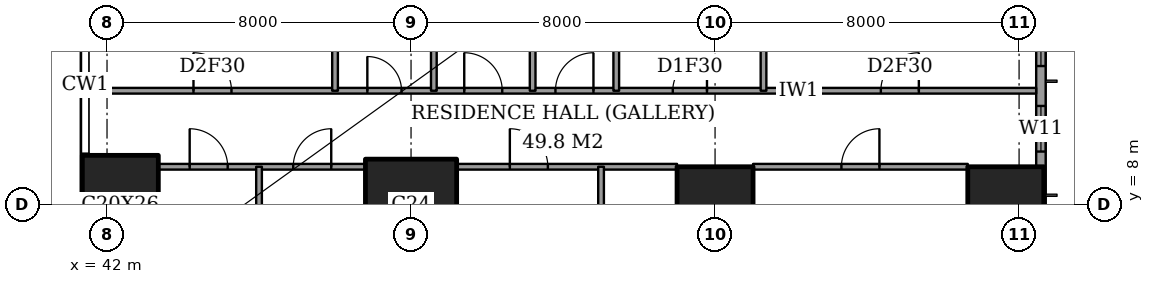
"""IFC4 building model, lengths in metres.
Left out: names, types, materials, properties, quantities, classifications, styles, units other than length and angle.
Written with IfcOpenShell. Run it as: python <this file> out.ifc"""

import sys

from ifc_helpers import new_model, si_unit, direction, frame, frame_2d, origin, origin_2d, place, context, subcontext, project, spatial, rectangle, extrude, element, fill, save


model = new_model("IFC4")
c1 = context("Model", 3, precision=1e-05, world=origin(), true_north=direction((0.0, 1.0)))
c2 = subcontext(c1, "Body", "Model", "MODEL_VIEW")
j1 = project(units=[si_unit("LENGTHUNIT", "METRE"), si_unit("PLANEANGLEUNIT", "RADIAN")], contexts=[c1])
p1 = place(None, origin())
s1 = spatial("IfcSite", under=j1, at=p1, CompositionType="ELEMENT")
p2 = place(p1, origin())
s2 = spatial("IfcBuilding", under=s1, at=p2, CompositionType="ELEMENT")
p3 = place(p2, frame((0.0, 0.0, 153.8)))
s3 = spatial("IfcBuildingStorey", under=s2, at=p3, CompositionType="ELEMENT", Elevation=153.8)
p4 = place(p3, frame((42.35, 8.0, 0.0), z_axis=(0.0, 0.0, 1.0), x_axis=(1.0, 0.0, 0.0)))
e1 = element("IfcColumn", 1, at=p4, inside=s3, PredefinedType="COLUMN", context=c2, shape_type="SweptSolid", body=[
    extrude(rectangle(XDim=2.0, YDim=2.6, at=origin_2d()), origin(), (0.0, 0.0, 1.0), 3.6),
])
p5 = place(p3, frame((50.0, 8.0, 0.0), z_axis=(0.0, 0.0, 1.0), x_axis=(1.0, 0.0, 0.0)))
e2 = element("IfcColumn", 2, at=p5, inside=s3, PredefinedType="COLUMN", context=c2, shape_type="SweptSolid", body=[
    extrude(rectangle(XDim=2.4, YDim=2.4, at=origin_2d()), origin(), (0.0, 0.0, 1.0), 3.6),
])
for number, where, z_axis, x_axis in (
    (3, (58.0, 8.0, 0.0), (0.0, 0.0, 1.0), (1.0, 0.0, 0.0)),
    (4, (65.65, 8.0, 0.0), (0.0, 0.0, 1.0), (1.0, 0.0, 0.0)),
):
    element("IfcColumn", number, at=place(p3, frame(where, z_axis=z_axis, x_axis=x_axis)), inside=s3, PredefinedType="COLUMN", context=c2, shape_type="SweptSolid", body=[
        extrude(rectangle(XDim=2.0, YDim=2.0, at=origin_2d()), origin(), (0.0, 0.0, 1.0), 3.6),
    ])
p6 = place(p3, frame((66.575, 3.175, 0.0), z_axis=(0.0, 0.0, 1.0), x_axis=(0.0, 1.0, 0.0)))
e5 = element("IfcWall", 5, at=p6, inside=s3, PredefinedType="SOLIDWALL", context=c2, shape_type="SweptSolid", body=[
    extrude(rectangle(XDim=41.65, YDim=0.25, at=frame_2d((20.825, 0.0))), origin(), (0.0, 0.0, 1.0), 3.6),
])
p7 = place(p6, frame((0.775, 0.0, 0.4)))
e6 = element("IfcOpeningElement", 6, at=p7, cuts=e5, PredefinedType="OPENING", context=c2, shape_type="SweptSolid", body=[
    extrude(rectangle(XDim=2.4, YDim=2.2, at=frame_2d((1.2, 1.1))), frame((0.0, 0.135, 0.0), z_axis=(0.0, -1.0, 0.0), x_axis=(1.0, 0.0, 0.0)), (0.0, 0.0, 1.0), 0.27),
])
p8 = place(p6, frame((6.225, 0.0, 0.4)))
e7 = element("IfcOpeningElement", 7, at=p8, cuts=e5, PredefinedType="OPENING", context=c2, shape_type="SweptSolid", body=[
    extrude(rectangle(XDim=1.2, YDim=2.2, at=frame_2d((0.6, 1.1))), frame((0.0, 0.135, 0.0), z_axis=(0.0, -1.0, 0.0), x_axis=(1.0, 0.0, 0.0)), (0.0, 0.0, 1.0), 0.27),
])
p9 = place(p6, frame((8.475, 0.0, 0.4)))
e8 = element("IfcOpeningElement", 8, at=p9, cuts=e5, PredefinedType="OPENING", context=c2, shape_type="SweptSolid", body=[
    extrude(rectangle(XDim=2.4, YDim=2.2, at=frame_2d((1.2, 1.1))), frame((0.0, 0.135, 0.0), z_axis=(0.0, -1.0, 0.0), x_axis=(1.0, 0.0, 0.0)), (0.0, 0.0, 1.0), 0.27),
])
p10 = place(p6, frame((15.775, 0.0, 0.4)))
e9 = element("IfcOpeningElement", 9, at=p10, cuts=e5, PredefinedType="OPENING", context=c2, shape_type="SweptSolid", body=[
    extrude(rectangle(XDim=2.4, YDim=2.2, at=frame_2d((1.2, 1.1))), frame((0.0, 0.135, 0.0), z_axis=(0.0, -1.0, 0.0), x_axis=(1.0, 0.0, 0.0)), (0.0, 0.0, 1.0), 0.27),
])
p11 = place(p6, frame((23.475, 0.0, 0.4)))
e10 = element("IfcOpeningElement", 10, at=p11, cuts=e5, PredefinedType="OPENING", context=c2, shape_type="SweptSolid", body=[
    extrude(rectangle(XDim=2.4, YDim=2.2, at=frame_2d((1.2, 1.1))), frame((0.0, 0.135, 0.0), z_axis=(0.0, -1.0, 0.0), x_axis=(1.0, 0.0, 0.0)), (0.0, 0.0, 1.0), 0.27),
])
p12 = place(p6, frame((30.975, 0.0, 0.4)))
e11 = element("IfcOpeningElement", 11, at=p12, cuts=e5, PredefinedType="OPENING", context=c2, shape_type="SweptSolid", body=[
    extrude(rectangle(XDim=2.4, YDim=2.2, at=frame_2d((1.2, 1.1))), frame((0.0, 0.135, 0.0), z_axis=(0.0, -1.0, 0.0), x_axis=(1.0, 0.0, 0.0)), (0.0, 0.0, 1.0), 0.27),
])
p13 = place(p6, frame((34.5, 0.0, 0.4)))
e12 = element("IfcOpeningElement", 12, at=p13, cuts=e5, PredefinedType="OPENING", context=c2, shape_type="SweptSolid", body=[
    extrude(rectangle(XDim=1.2, YDim=2.2, at=frame_2d((0.6, 1.1))), frame((0.0, 0.135, 0.0), z_axis=(0.0, -1.0, 0.0), x_axis=(1.0, 0.0, 0.0)), (0.0, 0.0, 1.0), 0.27),
])
p14 = place(p6, frame((38.475, 0.0, 0.4)))
e13 = element("IfcOpeningElement", 13, at=p14, cuts=e5, PredefinedType="OPENING", context=c2, shape_type="SweptSolid", body=[
    extrude(rectangle(XDim=2.4, YDim=2.2, at=frame_2d((1.2, 1.1))), frame((0.0, 0.135, 0.0), z_axis=(0.0, -1.0, 0.0), x_axis=(1.0, 0.0, 0.0)), (0.0, 0.0, 1.0), 0.27),
])
p15 = place(p3, frame((43.35, 9.0, 0.0), z_axis=(0.0, 0.0, 1.0), x_axis=(1.0, 0.0, 0.0)))
e14 = element("IfcWall", 14, at=p15, inside=s3, PredefinedType="PARTITIONING", context=c2, shape_type="SweptSolid", body=[
    extrude(rectangle(XDim=5.45, YDim=0.15, at=frame_2d((2.725, 0.0))), origin(), (0.0, 0.0, 1.0), 3.35),
])
p16 = place(p15, frame((3.55, 0.0, 0.0)))
e15 = element("IfcOpeningElement", 15, at=p16, cuts=e14, PredefinedType="OPENING", context=c2, shape_type="SweptSolid", body=[
    extrude(rectangle(XDim=1.0, YDim=2.1, at=frame_2d((0.5, 1.05))), frame((0.0, 0.085, 0.0), z_axis=(0.0, -1.0, 0.0), x_axis=(1.0, 0.0, 0.0)), (0.0, 0.0, 1.0), 0.17),
])
p17 = place(p15, frame((0.825, 0.0, 0.0)))
e16 = element("IfcOpeningElement", 16, at=p17, cuts=e14, PredefinedType="OPENING", context=c2, shape_type="SweptSolid", body=[
    extrude(rectangle(XDim=1.0, YDim=2.1, at=frame_2d((0.5, 1.05))), frame((0.0, 0.085, 0.0), z_axis=(0.0, -1.0, 0.0), x_axis=(1.0, 0.0, 0.0)), (0.0, 0.0, 1.0), 0.17),
])
p18 = place(p3, frame((51.2, 9.0, 0.0), z_axis=(0.0, 0.0, 1.0), x_axis=(1.0, 0.0, 0.0)))
e17 = element("IfcWall", 17, at=p18, inside=s3, PredefinedType="PARTITIONING", context=c2, shape_type="SweptSolid", body=[
    extrude(rectangle(XDim=5.8, YDim=0.15, at=frame_2d((2.9, 0.0))), origin(), (0.0, 0.0, 1.0), 3.35),
])
p19 = place(p18, frame((1.4, 0.0, 0.0)))
e18 = element("IfcOpeningElement", 18, at=p19, cuts=e17, PredefinedType="OPENING", context=c2, shape_type="SweptSolid", body=[
    extrude(rectangle(XDim=1.0, YDim=2.1, at=frame_2d((0.5, 1.05))), frame((0.0, 0.085, 0.0), z_axis=(0.0, -1.0, 0.0), x_axis=(1.0, 0.0, 0.0)), (0.0, 0.0, 1.0), 0.17),
])
p20 = place(p3, frame((59.0, 9.0, 0.0), z_axis=(0.0, 0.0, 1.0), x_axis=(1.0, 0.0, 0.0)))
e19 = element("IfcWall", 19, at=p20, inside=s3, PredefinedType="PARTITIONING", context=c2, shape_type="SweptSolid", body=[
    extrude(rectangle(XDim=5.65, YDim=0.15, at=frame_2d((2.825, 0.0))), origin(), (0.0, 0.0, 1.0), 3.35),
])
p21 = place(p20, frame((2.325, 0.0, 0.0)))
e20 = element("IfcOpeningElement", 20, at=p21, cuts=e19, PredefinedType="OPENING", context=c2, shape_type="SweptSolid", body=[
    extrude(rectangle(XDim=1.0, YDim=2.1, at=frame_2d((0.5, 1.05))), frame((0.0, 0.085, 0.0), z_axis=(0.0, -1.0, 0.0), x_axis=(1.0, 0.0, 0.0)), (0.0, 0.0, 1.0), 0.17),
])
p22 = place(p3, frame((41.439, 11.0, 0.0), z_axis=(0.0, 0.0, 1.0), x_axis=(1.0, 0.0, 0.0)))
e21 = element("IfcWall", 21, at=p22, inside=s3, PredefinedType="PARTITIONING", context=c2, shape_type="SweptSolid", body=[
    extrude(rectangle(XDim=25.011, YDim=0.15, at=frame_2d((12.505, 0.0))), origin(), (0.0, 0.0, 1.0), 3.35),
])
p23 = place(p22, frame((12.361, 0.0, 0.0)))
e22 = element("IfcOpeningElement", 22, at=p23, cuts=e21, PredefinedType="OPENING", context=c2, shape_type="SweptSolid", body=[
    extrude(rectangle(XDim=1.0, YDim=2.1, at=frame_2d((0.5, 1.05))), frame((0.0, 0.085, 0.0), z_axis=(0.0, -1.0, 0.0), x_axis=(1.0, 0.0, 0.0)), (0.0, 0.0, 1.0), 0.17),
])
p24 = place(p22, frame((20.924, 0.0, 0.0)))
e23 = element("IfcOpeningElement", 23, at=p24, cuts=e21, PredefinedType="OPENING", context=c2, shape_type="SweptSolid", body=[
    extrude(rectangle(XDim=1.0, YDim=2.1, at=frame_2d((0.5, 1.05))), frame((0.0, 0.085, 0.0), z_axis=(0.0, -1.0, 0.0), x_axis=(1.0, 0.0, 0.0)), (0.0, 0.0, 1.0), 0.17),
])
p25 = place(p22, frame((15.448, 0.0, 0.0)))
e24 = element("IfcOpeningElement", 24, at=p25, cuts=e21, PredefinedType="OPENING", context=c2, shape_type="SweptSolid", body=[
    extrude(rectangle(XDim=0.9, YDim=2.1, at=frame_2d((0.45, 1.05))), frame((0.0, 0.085, 0.0), z_axis=(0.0, -1.0, 0.0), x_axis=(1.0, 0.0, 0.0)), (0.0, 0.0, 1.0), 0.17),
])
p26 = place(p22, frame((9.961, 0.0, 0.0)))
e25 = element("IfcOpeningElement", 25, at=p26, cuts=e21, PredefinedType="OPENING", context=c2, shape_type="SweptSolid", body=[
    extrude(rectangle(XDim=1.0, YDim=2.1, at=frame_2d((0.5, 1.05))), frame((0.0, 0.085, 0.0), z_axis=(0.0, -1.0, 0.0), x_axis=(1.0, 0.0, 0.0)), (0.0, 0.0, 1.0), 0.17),
])
p27 = place(p22, frame((7.411, 0.0, 0.0)))
e26 = element("IfcOpeningElement", 26, at=p27, cuts=e21, PredefinedType="OPENING", context=c2, shape_type="SweptSolid", body=[
    extrude(rectangle(XDim=0.9, YDim=2.1, at=frame_2d((0.45, 1.05))), frame((0.0, 0.085, 0.0), z_axis=(0.0, -1.0, 0.0), x_axis=(1.0, 0.0, 0.0)), (0.0, 0.0, 1.0), 0.17),
])
p28 = place(p22, frame((2.836, 0.0, 0.0)))
e27 = element("IfcOpeningElement", 27, at=p28, cuts=e21, PredefinedType="OPENING", context=c2, shape_type="SweptSolid", body=[
    extrude(rectangle(XDim=1.0, YDim=2.1, at=frame_2d((0.5, 1.05))), frame((0.0, 0.085, 0.0), z_axis=(0.0, -1.0, 0.0), x_axis=(1.0, 0.0, 0.0)), (0.0, 0.0, 1.0), 0.17),
])
p29 = place(p3, frame((46.0, -0.45, 0.0), z_axis=(0.0, 0.0, 1.0), x_axis=(0.0, 1.0, 0.0)))
e28 = element("IfcWall", 28, at=p29, inside=s3, PredefinedType="PARTITIONING", context=c2, shape_type="SweptSolid", body=[
    extrude(rectangle(XDim=9.45, YDim=0.15, at=frame_2d((4.725, 0.0))), origin(), (0.0, 0.0, 1.0), 3.35),
])
p30 = place(p3, frame((48.0, 11.0, 0.0), z_axis=(0.0, 0.0, 1.0), x_axis=(0.0, 1.0, 0.0)))
e29 = element("IfcWall", 29, at=p30, inside=s3, PredefinedType="PARTITIONING", context=c2, shape_type="SweptSolid", body=[
    extrude(rectangle(XDim=6.5, YDim=0.15, at=frame_2d((3.25, 0.0))), origin(), (0.0, 0.0, 1.0), 3.35),
])
p31 = place(p3, frame((50.6, 11.0, 0.0), z_axis=(0.0, 0.0, 1.0), x_axis=(0.0, 1.0, 0.0)))
e30 = element("IfcWall", 30, at=p31, inside=s3, PredefinedType="PARTITIONING", context=c2, shape_type="SweptSolid", body=[
    extrude(rectangle(XDim=3.8, YDim=0.15, at=frame_2d((1.9, 0.0))), origin(), (0.0, 0.0, 1.0), 3.35),
])
p32 = place(p3, frame((53.2, 11.0, 0.0), z_axis=(0.0, 0.0, 1.0), x_axis=(0.0, 1.0, 0.0)))
e31 = element("IfcWall", 31, at=p32, inside=s3, PredefinedType="PARTITIONING", context=c2, shape_type="SweptSolid", body=[
    extrude(rectangle(XDim=6.5, YDim=0.15, at=frame_2d((3.25, 0.0))), origin(), (0.0, 0.0, 1.0), 3.35),
])
p33 = place(p3, frame((55.0, -0.45, 0.0), z_axis=(0.0, 0.0, 1.0), x_axis=(0.0, 1.0, 0.0)))
e32 = element("IfcWall", 32, at=p33, inside=s3, PredefinedType="PARTITIONING", context=c2, shape_type="SweptSolid", body=[
    extrude(rectangle(XDim=9.45, YDim=0.15, at=frame_2d((4.725, 0.0))), origin(), (0.0, 0.0, 1.0), 3.35),
])
p34 = place(p3, frame((55.4, 11.0, 0.0), z_axis=(0.0, 0.0, 1.0), x_axis=(0.0, 1.0, 0.0)))
e33 = element("IfcWall", 33, at=p34, inside=s3, PredefinedType="PARTITIONING", context=c2, shape_type="SweptSolid", body=[
    extrude(rectangle(XDim=10.6, YDim=0.15, at=frame_2d((5.3, 0.0))), origin(), (0.0, 0.0, 1.0), 3.35),
])
p35 = place(p34, frame((8.05, 0.0, 0.0)))
e34 = element("IfcOpeningElement", 34, at=p35, cuts=e33, PredefinedType="OPENING", context=c2, shape_type="SweptSolid", body=[
    extrude(rectangle(XDim=1.0, YDim=2.1, at=frame_2d((0.5, 1.05))), frame((0.0, 0.085, 0.0), z_axis=(0.0, -1.0, 0.0), x_axis=(1.0, 0.0, 0.0)), (0.0, 0.0, 1.0), 0.17),
])
p36 = place(p3, frame((59.275, 11.0, 0.0), z_axis=(0.0, 0.0, 1.0), x_axis=(0.0, 1.0, 0.0)))
e35 = element("IfcWall", 35, at=p36, inside=s3, PredefinedType="PARTITIONING", context=c2, shape_type="SweptSolid", body=[
    extrude(rectangle(XDim=3.8, YDim=0.15, at=frame_2d((1.9, 0.0))), origin(), (0.0, 0.0, 1.0), 3.35),
])
p37 = place(p8, origin())
e36 = element("IfcWindow", 36, at=p37, inside=s3, PartitioningType="SINGLE_PANEL", PredefinedType="WINDOW", context=c2, shape_type="SweptSolid", body=[
    extrude(rectangle(XDim=1.2, YDim=2.2, at=frame_2d((0.6, 1.1))), frame((0.0, 0.03, 0.0), z_axis=(0.0, -1.0, 0.0), x_axis=(1.0, 0.0, 0.0)), (0.0, 0.0, 1.0), 0.06),
])
fill(e7, e36)
p38 = place(p9, origin())
e37 = element("IfcWindow", 37, at=p38, inside=s3, PartitioningType="SINGLE_PANEL", PredefinedType="WINDOW", context=c2, shape_type="SweptSolid", body=[
    extrude(rectangle(XDim=2.4, YDim=2.2, at=frame_2d((1.2, 1.1))), frame((0.0, 0.03, 0.0), z_axis=(0.0, -1.0, 0.0), x_axis=(1.0, 0.0, 0.0)), (0.0, 0.0, 1.0), 0.06),
])
fill(e8, e37)
p39 = place(p21, origin())
e38 = element("IfcDoor", 38, at=p39, inside=s3, OperationType="SINGLE_SWING_LEFT", PredefinedType="DOOR", context=c2, shape_type="SweptSolid", body=[
    extrude(rectangle(XDim=1.0, YDim=2.1, at=frame_2d((0.5, 1.05))), frame((0.0, 0.025, 0.0), z_axis=(0.0, -1.0, 0.0), x_axis=(1.0, 0.0, 0.0)), (0.0, 0.0, 1.0), 0.05),
])
fill(e20, e38)
p40 = place(p19, origin())
e39 = element("IfcDoor", 39, at=p40, inside=s3, OperationType="SINGLE_SWING_RIGHT", PredefinedType="DOOR", context=c2, shape_type="SweptSolid", body=[
    extrude(rectangle(XDim=1.0, YDim=2.1, at=frame_2d((0.5, 1.05))), frame((0.0, 0.025, 0.0), z_axis=(0.0, -1.0, 0.0), x_axis=(1.0, 0.0, 0.0)), (0.0, 0.0, 1.0), 0.05),
])
fill(e18, e39)
p41 = place(p16, origin())
e40 = element("IfcDoor", 40, at=p41, inside=s3, OperationType="SINGLE_SWING_LEFT", PredefinedType="DOOR", context=c2, shape_type="SweptSolid", body=[
    extrude(rectangle(XDim=1.0, YDim=2.1, at=frame_2d((0.5, 1.05))), frame((0.0, 0.025, 0.0), z_axis=(0.0, -1.0, 0.0), x_axis=(1.0, 0.0, 0.0)), (0.0, 0.0, 1.0), 0.05),
])
fill(e15, e40)
p42 = place(p17, origin())
e41 = element("IfcDoor", 41, at=p42, inside=s3, OperationType="SINGLE_SWING_RIGHT", PredefinedType="DOOR", context=c2, shape_type="SweptSolid", body=[
    extrude(rectangle(XDim=1.0, YDim=2.1, at=frame_2d((0.5, 1.05))), frame((0.0, 0.025, 0.0), z_axis=(0.0, -1.0, 0.0), x_axis=(1.0, 0.0, 0.0)), (0.0, 0.0, 1.0), 0.05),
])
fill(e16, e41)
p43 = place(p23, origin())
e42 = element("IfcDoor", 42, at=p43, inside=s3, OperationType="SINGLE_SWING_LEFT", PredefinedType="DOOR", context=c2, shape_type="SweptSolid", body=[
    extrude(rectangle(XDim=1.0, YDim=2.1, at=frame_2d((0.5, 1.05))), frame((0.0, 0.025, 0.0), z_axis=(0.0, -1.0, 0.0), x_axis=(1.0, 0.0, 0.0)), (0.0, 0.0, 1.0), 0.05),
])
fill(e22, e42)
p44 = place(p24, origin())
e43 = element("IfcDoor", 43, at=p44, inside=s3, OperationType="SINGLE_SWING_LEFT", PredefinedType="DOOR", context=c2, shape_type="SweptSolid", body=[
    extrude(rectangle(XDim=1.0, YDim=2.1, at=frame_2d((0.5, 1.05))), frame((0.0, 0.025, 0.0), z_axis=(0.0, -1.0, 0.0), x_axis=(1.0, 0.0, 0.0)), (0.0, 0.0, 1.0), 0.05),
])
fill(e23, e43)
p45 = place(p25, origin())
e44 = element("IfcDoor", 44, at=p45, inside=s3, OperationType="SINGLE_SWING_LEFT", PredefinedType="DOOR", context=c2, shape_type="SweptSolid", body=[
    extrude(rectangle(XDim=0.9, YDim=2.1, at=frame_2d((0.45, 1.05))), frame((0.0, 0.025, 0.0), z_axis=(0.0, -1.0, 0.0), x_axis=(1.0, 0.0, 0.0)), (0.0, 0.0, 1.0), 0.05),
])
fill(e24, e44)
p46 = place(p26, origin())
e45 = element("IfcDoor", 45, at=p46, inside=s3, OperationType="SINGLE_SWING_RIGHT", PredefinedType="DOOR", context=c2, shape_type="SweptSolid", body=[
    extrude(rectangle(XDim=1.0, YDim=2.1, at=frame_2d((0.5, 1.05))), frame((0.0, 0.025, 0.0), z_axis=(0.0, -1.0, 0.0), x_axis=(1.0, 0.0, 0.0)), (0.0, 0.0, 1.0), 0.05),
])
fill(e25, e45)
p47 = place(p27, origin())
e46 = element("IfcDoor", 46, at=p47, inside=s3, OperationType="SINGLE_SWING_RIGHT", PredefinedType="DOOR", context=c2, shape_type="SweptSolid", body=[
    extrude(rectangle(XDim=0.9, YDim=2.1, at=frame_2d((0.45, 1.05))), frame((0.0, 0.025, 0.0), z_axis=(0.0, -1.0, 0.0), x_axis=(1.0, 0.0, 0.0)), (0.0, 0.0, 1.0), 0.05),
])
fill(e26, e46)
p48 = place(p28, origin())
e47 = element("IfcDoor", 47, at=p48, inside=s3, OperationType="SINGLE_SWING_RIGHT", PredefinedType="DOOR", context=c2, shape_type="SweptSolid", body=[
    extrude(rectangle(XDim=1.0, YDim=2.1, at=frame_2d((0.5, 1.05))), frame((0.0, 0.025, 0.0), z_axis=(0.0, -1.0, 0.0), x_axis=(1.0, 0.0, 0.0)), (0.0, 0.0, 1.0), 0.05),
])
fill(e27, e47)
save(model, sys.argv[1])
